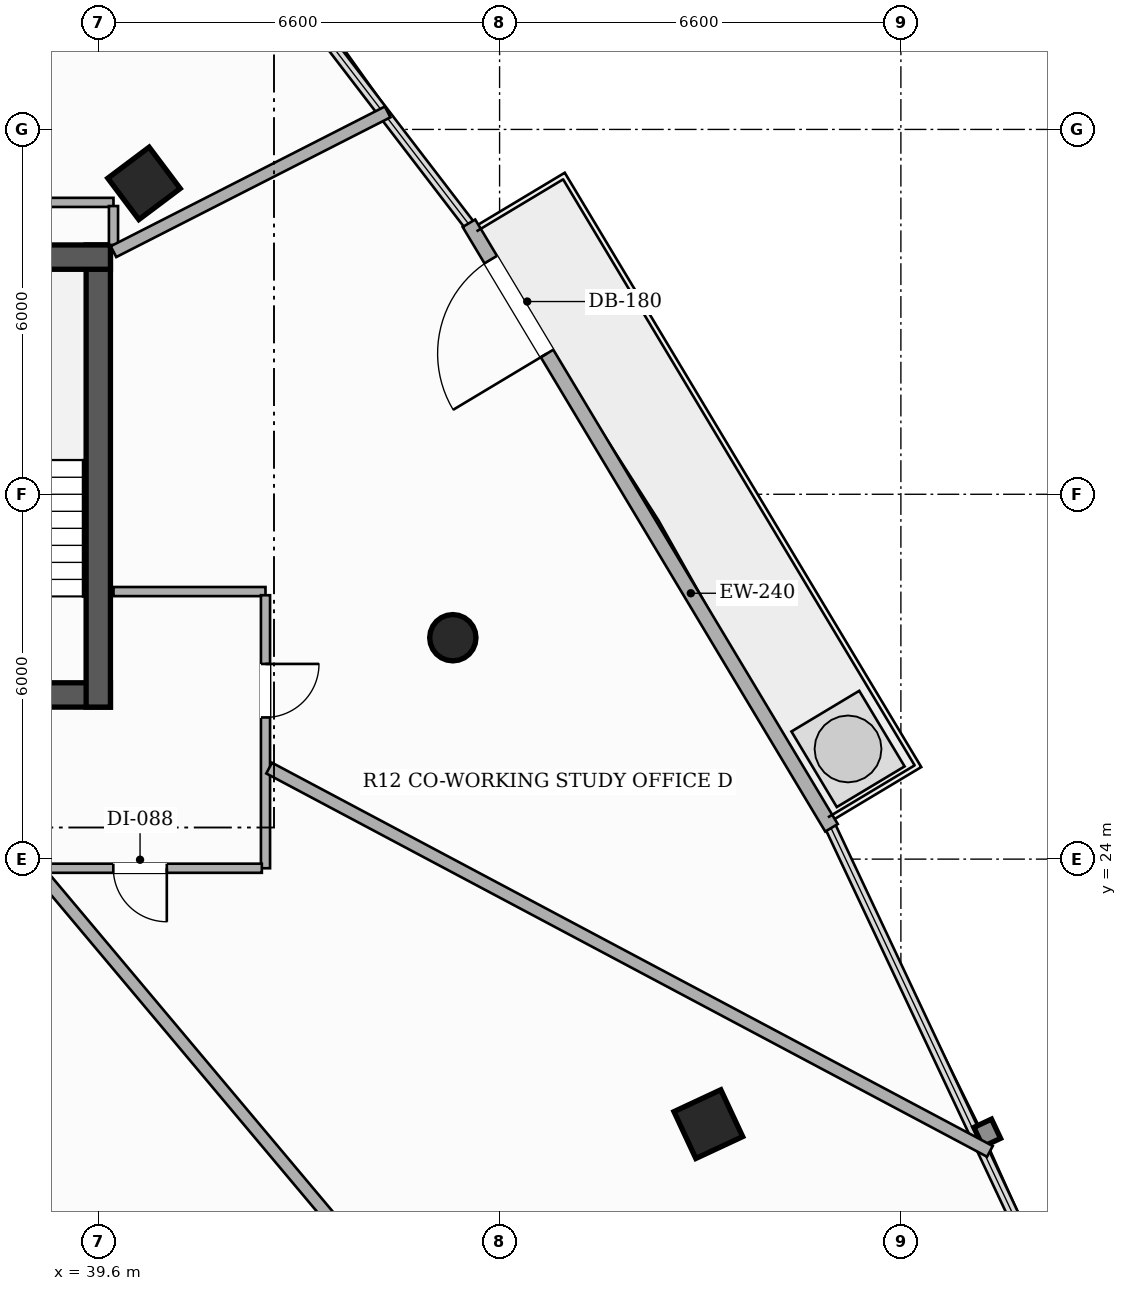
"""IFC4 building model, lengths in metres.
Left out: names, types, materials, properties, quantities, classifications, styles, units other than length and angle.
Written with IfcOpenShell. Run it as: python <this file> out.ifc"""

import sys

from ifc_helpers import new_model, si_unit, direction, frame, frame_2d, origin, origin_2d, place, context, subcontext, project, spatial, rectangle, hollow_rectangle, hollow_circle, extrude, element, fill, save


model = new_model("IFC4")
c1 = context("Model", 3, precision=1e-05, world=origin(), true_north=direction((0.0, 1.0)))
c2 = subcontext(c1, "Body", "Model", "MODEL_VIEW")
j1 = project(units=[si_unit("LENGTHUNIT", "METRE"), si_unit("PLANEANGLEUNIT", "RADIAN")], contexts=[c1])
p1 = place(None, origin())
s1 = spatial("IfcSite", under=j1, at=p1, CompositionType="ELEMENT")
p2 = place(p1, origin())
s2 = spatial("IfcBuilding", under=s1, at=p2, CompositionType="ELEMENT")
p3 = place(p2, frame((0.0, 0.0, 126.5)))
s3 = spatial("IfcBuildingStorey", under=s2, at=p3, CompositionType="ELEMENT", Elevation=126.5)
p4 = place(p3, frame((26.2, 26.7, 0.0), z_axis=(0.0, 0.0, 1.0), x_axis=(1.0, 0.0, 0.0)))
e1 = element("IfcWall", 1, at=p4, inside=s3, PredefinedType="SHEAR", context=c2, shape_type="SweptSolid", body=[
    extrude(rectangle(XDim=13.6, YDim=0.4, at=frame_2d((6.8, 0.0))), origin(), (0.0, 0.0, 1.0), 3.3),
])
p5 = place(p4, frame((4.35, 0.0, 0.0)))
e2 = element("IfcOpeningElement", 2, at=p5, cuts=e1, PredefinedType="OPENING", context=c2, shape_type="SweptSolid", body=[
    extrude(rectangle(XDim=1.05, YDim=2.15, at=frame_2d((0.525, 1.075))), frame((0.0, 0.21, 0.0), z_axis=(0.0, -1.0, 0.0), x_axis=(1.0, 0.0, 0.0)), (0.0, 0.0, 1.0), 0.42),
])
p6 = place(p4, frame((8.3, 0.0, 0.0)))
e3 = element("IfcOpeningElement", 3, at=p6, cuts=e1, PredefinedType="OPENING", context=c2, shape_type="SweptSolid", body=[
    extrude(rectangle(XDim=1.05, YDim=2.15, at=frame_2d((0.525, 1.075))), frame((0.0, 0.21, 0.0), z_axis=(0.0, -1.0, 0.0), x_axis=(1.0, 0.0, 0.0)), (0.0, 0.0, 1.0), 0.42),
])
p7 = place(p3, frame((39.6, 26.5, 0.0), z_axis=(0.0, 0.0, 1.0), x_axis=(0.0, 1.0, 0.0)))
e4 = element("IfcWall", 4, at=p7, inside=s3, PredefinedType="SHEAR", context=c2, shape_type="SweptSolid", body=[
    extrude(rectangle(XDim=7.6, YDim=0.4, at=frame_2d((3.8, 0.0))), origin(), (0.0, 0.0, 1.0), 3.3),
])
p8 = place(p3, frame((36.12, 33.9, 0.0), z_axis=(0.0, 0.0, 1.0), x_axis=(1.0, 0.0, 0.0)))
e5 = element("IfcWall", 5, at=p8, inside=s3, PredefinedType="SHEAR", context=c2, shape_type="SweptSolid", body=[
    extrude(rectangle(XDim=3.68, YDim=0.4, at=frame_2d((1.84, 0.0))), origin(), (0.0, 0.0, 1.0), 3.3),
])
p9 = place(p3, frame((49.633, 19.642, 0.0), z_axis=(0.0, 0.0, 1.0), x_axis=(-0.422618261741, 0.906307787037, 0.0)))
e6 = element("IfcColumn", 6, at=p9, inside=s3, PredefinedType="COLUMN", context=c2, shape_type="SweptSolid", body=[
    extrude(hollow_rectangle(XDim=0.85, YDim=0.85, WallThickness=0.028, at=origin_2d()), origin(), (0.0, 0.0, 1.0), 3.3),
])
p10 = place(p3, frame((45.431, 27.641, 0.0), z_axis=(0.0, 0.0, 1.0), x_axis=(1.0, 0.0, 0.0)))
e7 = element("IfcColumn", 7, at=p10, inside=s3, PredefinedType="COLUMN", context=c2, shape_type="SweptSolid", body=[
    extrude(hollow_circle(Radius=0.381, WallThickness=0.022, at=origin_2d()), origin(), (0.0, 0.0, 1.0), 3.3),
])
p11 = place(p3, frame((40.352, 35.113, 0.0), z_axis=(0.0, 0.0, 1.0), x_axis=(-0.600420225326, 0.799684658487, 0.0)))
e8 = element("IfcColumn", 8, at=p11, inside=s3, PredefinedType="COLUMN", context=c2, shape_type="SweptSolid", body=[
    extrude(hollow_rectangle(XDim=0.85, YDim=0.85, WallThickness=0.028, at=origin_2d()), origin(), (0.0, 0.0, 1.0), 3.3),
])
p12 = place(p3, frame((51.659, 24.515, 0.0), z_axis=(0.0, 0.0, 1.0), x_axis=(-0.514343998995, 0.857583961311, 0.0)))
e9 = element("IfcWall", 9, at=p12, inside=s3, PredefinedType="SOLIDWALL", context=c2, shape_type="SweptSolid", body=[
    extrude(rectangle(XDim=11.593, YDim=0.24, at=frame_2d((5.797, 0.0))), origin(), (0.0, 0.0, 1.0), 2.624),
])
p13 = place(p12, frame((9.096, 0.0, 0.0)))
e10 = element("IfcOpeningElement", 10, at=p13, cuts=e9, PredefinedType="OPENING", context=c2, shape_type="SweptSolid", body=[
    extrude(rectangle(XDim=1.8, YDim=2.2, at=frame_2d((0.9, 1.1))), frame((0.0, 0.13, 0.0), z_axis=(0.0, -1.0, 0.0), x_axis=(1.0, 0.0, 0.0)), (0.0, 0.0, 1.0), 0.26),
])
p14 = place(p3, frame((39.85, 28.4, 0.0), z_axis=(0.0, 0.0, 1.0), x_axis=(1.0, 0.0, 0.0)))
e11 = element("IfcWall", 11, at=p14, inside=s3, PredefinedType="PARTITIONING", context=c2, shape_type="SweptSolid", body=[
    extrude(rectangle(XDim=2.5, YDim=0.15, at=frame_2d((1.25, 0.0))), origin(), (0.0, 0.0, 1.0), 2.721),
])
p15 = place(p3, frame((42.35, 28.34, 0.0), z_axis=(0.0, 0.0, 1.0), x_axis=(0.0, -1.0, 0.0)))
e12 = element("IfcWall", 12, at=p15, inside=s3, PredefinedType="PARTITIONING", context=c2, shape_type="SweptSolid", body=[
    extrude(rectangle(XDim=4.49, YDim=0.15, at=frame_2d((2.245, 0.0))), origin(), (0.0, 0.0, 1.0), 2.721),
])
p16 = place(p15, frame((1.13, 0.0, 0.0)))
e13 = element("IfcOpeningElement", 13, at=p16, cuts=e12, PredefinedType="OPENING", context=c2, shape_type="SweptSolid", body=[
    extrude(rectangle(XDim=0.88, YDim=2.1, at=frame_2d((0.44, 1.05))), frame((0.0, 0.085, 0.0), z_axis=(0.0, -1.0, 0.0), x_axis=(1.0, 0.0, 0.0)), (0.0, 0.0, 1.0), 0.17),
])
p17 = place(p3, frame((42.29, 23.85, 0.0), z_axis=(0.0, 0.0, 1.0), x_axis=(-1.0, 0.0, 0.0)))
e14 = element("IfcWall", 14, at=p17, inside=s3, PredefinedType="PARTITIONING", context=c2, shape_type="SweptSolid", body=[
    extrude(rectangle(XDim=8.111, YDim=0.15, at=frame_2d((4.056, 0.0))), origin(), (0.0, 0.0, 1.0), 2.492),
])
p18 = place(p17, frame((1.563, 0.0, 0.0)))
e15 = element("IfcOpeningElement", 15, at=p18, cuts=e14, PredefinedType="OPENING", context=c2, shape_type="SweptSolid", body=[
    extrude(rectangle(XDim=0.88, YDim=2.1, at=frame_2d((0.44, 1.05))), frame((0.0, 0.085, 0.0), z_axis=(0.0, -1.0, 0.0), x_axis=(1.0, 0.0, 0.0)), (0.0, 0.0, 1.0), 0.17),
])
p19 = place(p17, frame((4.892, 0.0, 0.0)))
e16 = element("IfcOpeningElement", 16, at=p19, cuts=e14, PredefinedType="OPENING", context=c2, shape_type="SweptSolid", body=[
    extrude(rectangle(XDim=0.92, YDim=2.15, at=frame_2d((0.46, 1.075))), frame((0.0, 0.085, 0.0), z_axis=(0.0, -1.0, 0.0), x_axis=(1.0, 0.0, 0.0)), (0.0, 0.0, 1.0), 0.17),
])
p20 = place(p3, frame((37.91, 34.8, 0.0), z_axis=(0.0, 0.0, 1.0), x_axis=(1.0, 0.0, 0.0)))
e17 = element("IfcWall", 17, at=p20, inside=s3, PredefinedType="PARTITIONING", context=c2, shape_type="SweptSolid", body=[
    extrude(rectangle(XDim=1.94, YDim=0.15, at=frame_2d((0.97, 0.0))), origin(), (0.0, 0.0, 1.0), 2.721),
])
p21 = place(p3, frame((39.85, 34.74, 0.0), z_axis=(0.0, 0.0, 1.0), x_axis=(0.0, -1.0, 0.0)))
e18 = element("IfcWall", 18, at=p21, inside=s3, PredefinedType="PARTITIONING", context=c2, shape_type="SweptSolid", body=[
    extrude(rectangle(XDim=0.64, YDim=0.15, at=frame_2d((0.32, 0.0))), origin(), (0.0, 0.0, 1.0), 2.721),
])
p22 = place(p3, frame((54.526, 4.867, 0.0), z_axis=(0.0, 0.0, 1.0), x_axis=(-0.643084567011, 0.765795168222, 0.0)))
e19 = element("IfcWall", 19, at=p22, inside=s3, PredefinedType="PARTITIONING", context=c2, shape_type="SweptSolid", body=[
    extrude(rectangle(XDim=24.71, YDim=0.2, at=frame_2d((12.355, 0.0))), origin(), (0.0, 0.0, 1.0), 2.413),
])
p23 = place(p3, frame((42.41, 25.497, 0.0), z_axis=(0.0, 0.0, 1.0), x_axis=(0.882944726502, -0.46947695358, 0.0)))
e20 = element("IfcWall", 20, at=p23, inside=s3, PredefinedType="PARTITIONING", context=c2, shape_type="SweptSolid", body=[
    extrude(rectangle(XDim=13.426, YDim=0.2, at=frame_2d((6.713, 0.0))), origin(), (0.0, 0.0, 1.0), 2.413),
])
p24 = place(p3, frame((44.359, 36.288, 0.0), z_axis=(0.0, 0.0, 1.0), x_axis=(-0.890946333403, -0.454108611453, 0.0)))
e21 = element("IfcWall", 21, at=p24, inside=s3, PredefinedType="PARTITIONING", context=c2, shape_type="SweptSolid", body=[
    extrude(rectangle(XDim=5.061, YDim=0.2, at=frame_2d((2.53, 0.0))), origin(), (0.0, 0.0, 1.0), 2.413),
])
p25 = place(p13, origin())
e22 = element("IfcDoor", 22, at=p25, inside=s3, OperationType="SINGLE_SWING_LEFT", PredefinedType="DOOR", context=c2, shape_type="SweptSolid", body=[
    extrude(rectangle(XDim=1.8, YDim=2.2, at=frame_2d((0.9, 1.1))), frame((0.0, 0.025, 0.0), z_axis=(0.0, -1.0, 0.0), x_axis=(1.0, 0.0, 0.0)), (0.0, 0.0, 1.0), 0.05),
])
fill(e10, e22)
p26 = place(p18, origin())
e23 = element("IfcDoor", 23, at=p26, inside=s3, OperationType="SINGLE_SWING_LEFT", PredefinedType="DOOR", context=c2, shape_type="SweptSolid", body=[
    extrude(rectangle(XDim=0.88, YDim=2.1, at=frame_2d((0.44, 1.05))), frame((0.0, 0.025, 0.0), z_axis=(0.0, -1.0, 0.0), x_axis=(1.0, 0.0, 0.0)), (0.0, 0.0, 1.0), 0.05),
])
fill(e15, e23)
p27 = place(p16, origin())
e24 = element("IfcDoor", 24, at=p27, inside=s3, OperationType="SINGLE_SWING_LEFT", PredefinedType="DOOR", context=c2, shape_type="SweptSolid", body=[
    extrude(rectangle(XDim=0.88, YDim=2.1, at=frame_2d((0.44, 1.05))), frame((0.0, 0.025, 0.0), z_axis=(0.0, -1.0, 0.0), x_axis=(1.0, 0.0, 0.0)), (0.0, 0.0, 1.0), 0.05),
])
fill(e13, e24)
save(model, sys.argv[1])
